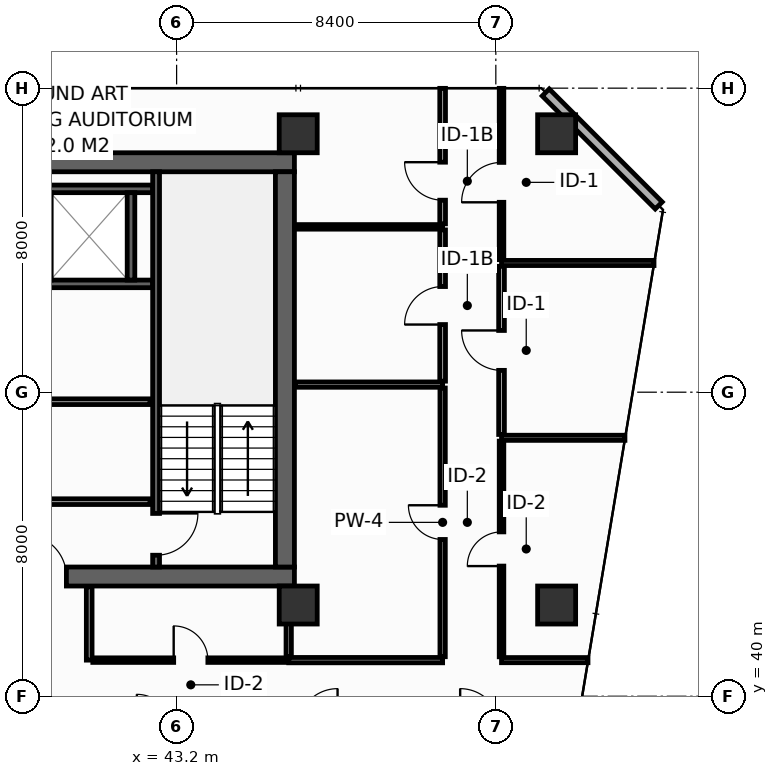
"""IFC4 building model, lengths in metres.
Left out: names, types, materials, properties, quantities, classifications, styles, units other than length and angle.
Written with IfcOpenShell. Run it as: python <this file> out.ifc"""

import sys

from ifc_helpers import new_model, si_unit, direction, frame, frame_2d, origin, origin_2d, place, context, subcontext, project, spatial, rectangle, hollow_rectangle, extrude, element, fill, save


model = new_model("IFC4")
c1 = context("Model", 3, precision=1e-05, world=origin(), true_north=direction((0.0, 1.0)))
c2 = subcontext(c1, "Body", "Model", "MODEL_VIEW")
j1 = project(units=[si_unit("LENGTHUNIT", "METRE"), si_unit("PLANEANGLEUNIT", "RADIAN")], contexts=[c1])
p1 = place(None, origin())
s1 = spatial("IfcSite", under=j1, at=p1, CompositionType="ELEMENT")
p2 = place(p1, origin())
s2 = spatial("IfcBuilding", under=s1, at=p2, CompositionType="ELEMENT")
p3 = place(p2, frame((0.0, 0.0, 148.6)))
s3 = spatial("IfcBuildingStorey", under=s2, at=p3, CompositionType="ELEMENT", Elevation=148.6)
p4 = place(p3, frame((13.6, 43.15, 0.0), z_axis=(0.0, 0.0, 1.0), x_axis=(1.0, 0.0, 0.0)))
e1 = element("IfcWall", 1, at=p4, inside=s3, PredefinedType="SHEAR", context=c2, shape_type="SweptSolid", body=[
    extrude(rectangle(XDim=32.7, YDim=0.5, at=frame_2d((16.35, 0.0))), origin(), (0.0, 0.0, 1.0), 3.55),
])
p5 = place(p4, frame((5.4, 0.0, 0.0)))
e2 = element("IfcOpeningElement", 2, at=p5, cuts=e1, PredefinedType="OPENING", context=c2, shape_type="SweptSolid", body=[
    extrude(rectangle(XDim=1.1, YDim=2.15, at=frame_2d((0.55, 1.075))), frame((0.0, 0.26, 0.0), z_axis=(0.0, -1.0, 0.0), x_axis=(1.0, 0.0, 0.0)), (0.0, 0.0, 1.0), 0.52),
])
p6 = place(p4, frame((25.6, 0.0, 0.0)))
e3 = element("IfcOpeningElement", 3, at=p6, cuts=e1, PredefinedType="OPENING", context=c2, shape_type="SweptSolid", body=[
    extrude(rectangle(XDim=1.1, YDim=2.15, at=frame_2d((0.55, 1.075))), frame((0.0, 0.26, 0.0), z_axis=(0.0, -1.0, 0.0), x_axis=(1.0, 0.0, 0.0)), (0.0, 0.0, 1.0), 0.52),
])
p7 = place(p3, frame((13.6, 54.05, 0.0), z_axis=(0.0, 0.0, 1.0), x_axis=(1.0, 0.0, 0.0)))
e4 = element("IfcWall", 4, at=p7, inside=s3, PredefinedType="SHEAR", context=c2, shape_type="SweptSolid", body=[
    extrude(rectangle(XDim=32.7, YDim=0.5, at=frame_2d((16.35, 0.0))), origin(), (0.0, 0.0, 1.0), 3.55),
])
p8 = place(p3, frame((46.05, 43.4, 0.0), z_axis=(0.0, 0.0, 1.0), x_axis=(0.0, 1.0, 0.0)))
e5 = element("IfcWall", 5, at=p8, inside=s3, PredefinedType="SHEAR", context=c2, shape_type="SweptSolid", body=[
    extrude(rectangle(XDim=10.4, YDim=0.5, at=frame_2d((5.2, 0.0))), origin(), (0.0, 0.0, 1.0), 3.55),
])
for number, where, z_axis, x_axis in (
    (6, (46.4, 54.8, 0.0), (0.0, 0.0, 1.0), (1.0, 0.0, 0.0)),
    (7, (53.2, 54.8, 0.0), (0.0, 0.0, 1.0), (1.0, 0.0, 0.0)),
    (8, (46.4, 42.4, 0.0), (0.0, 0.0, 1.0), (1.0, 0.0, 0.0)),
    (9, (53.2, 42.4, 0.0), (0.0, 0.0, 1.0), (1.0, 0.0, 0.0)),
):
    element("IfcColumn", number, at=place(p3, frame(where, z_axis=z_axis, x_axis=x_axis)), inside=s3, PredefinedType="COLUMN", context=c2, shape_type="SweptSolid", body=[
        extrude(hollow_rectangle(XDim=1.0, YDim=1.0, WallThickness=0.045, at=origin_2d()), origin(), (0.0, 0.0, 1.0), 3.8),
    ])
for number, where, z_axis, x_axis in (
    (10, (39.525, 50.85, 0.0), (0.0, 0.0, 1.0), (1.0, 0.0, 0.0)),
    (11, (39.525, 53.35, 0.0), (0.0, 0.0, 1.0), (1.0, 0.0, 0.0)),
):
    element("IfcWall", number, at=place(p3, frame(where, z_axis=z_axis, x_axis=x_axis)), inside=s3, PredefinedType="SHEAR", context=c2, shape_type="SweptSolid", body=[
        extrude(rectangle(XDim=3.045, YDim=0.2, at=frame_2d((1.522, 0.0))), origin(), (0.0, 0.0, 1.0), 3.55),
    ])
p9 = place(p3, frame((42.0, 50.95, 0.0), z_axis=(0.0, 0.0, 1.0), x_axis=(0.0, 1.0, 0.0)))
e12 = element("IfcWall", 12, at=p9, inside=s3, PredefinedType="SHEAR", context=c2, shape_type="SweptSolid", body=[
    extrude(rectangle(XDim=2.3, YDim=0.2, at=frame_2d((1.15, 0.0))), origin(), (0.0, 0.0, 1.0), 3.55),
])
p10 = place(p3, frame((42.66, 53.8, 0.0), z_axis=(0.0, 0.0, 1.0), x_axis=(0.0, -1.0, 0.0)))
e13 = element("IfcWall", 13, at=p10, inside=s3, PredefinedType="SHEAR", context=c2, shape_type="SweptSolid", body=[
    extrude(rectangle(XDim=10.4, YDim=0.18, at=frame_2d((5.2, 0.0))), origin(), (0.0, 0.0, 1.0), 3.55),
])
p11 = place(p10, frame((8.99, 0.0, 0.0)))
e14 = element("IfcOpeningElement", 14, at=p11, cuts=e13, PredefinedType="OPENING", context=c2, shape_type="SweptSolid", body=[
    extrude(rectangle(XDim=1.1, YDim=2.15, at=frame_2d((0.55, 1.075))), frame((0.0, 0.1, 0.0), z_axis=(0.0, -1.0, 0.0), x_axis=(1.0, 0.0, 0.0)), (0.0, 0.0, 1.0), 0.2),
])
p12 = place(p3, frame((34.05, 45.12, 0.0), z_axis=(0.0, 0.0, 1.0), x_axis=(1.0, 0.0, 0.0)))
e15 = element("IfcWall", 15, at=p12, inside=s3, PredefinedType="PARTITIONING", context=c2, shape_type="SweptSolid", body=[
    extrude(rectangle(XDim=8.45, YDim=0.15, at=frame_2d((4.225, 0.0))), origin(), (0.0, 0.0, 1.0), 3.55),
])
p13 = place(p12, frame((3.6, 0.0, 0.0)))
e16 = element("IfcOpeningElement", 16, at=p13, cuts=e15, PredefinedType="OPENING", context=c2, shape_type="SweptSolid", body=[
    extrude(rectangle(XDim=0.95, YDim=2.15, at=frame_2d((0.475, 1.075))), frame((0.0, 0.085, 0.0), z_axis=(0.0, -1.0, 0.0), x_axis=(1.0, 0.0, 0.0)), (0.0, 0.0, 1.0), 0.17),
])
p14 = place(p3, frame((34.05, 47.75, 0.0), z_axis=(0.0, 0.0, 1.0), x_axis=(1.0, 0.0, 0.0)))
e17 = element("IfcWall", 17, at=p14, inside=s3, PredefinedType="PARTITIONING", context=c2, shape_type="SweptSolid", body=[
    extrude(rectangle(XDim=8.45, YDim=0.15, at=frame_2d((4.225, 0.0))), origin(), (0.0, 0.0, 1.0), 3.55),
])
p15 = place(p3, frame((55.887, 52.913, 0.0), z_axis=(0.0, 0.0, 1.0), x_axis=(-0.707106781187, 0.707106781187, 0.0)))
e18 = element("IfcWall", 18, at=p15, inside=s3, PredefinedType="STANDARD", context=c2, shape_type="SweptSolid", body=[
    extrude(rectangle(XDim=4.206, YDim=0.26, at=frame_2d((2.103, 0.0))), origin(), (0.0, 0.0, 1.0), 3.55),
])
p16 = place(p3, frame((46.15, 40.95, 0.0), z_axis=(0.0, 0.0, 1.0), x_axis=(1.0, 0.0, 0.0)))
e19 = element("IfcWall", 19, at=p16, inside=s3, PredefinedType="PARTITIONING", context=c2, shape_type="SweptSolid", body=[
    extrude(rectangle(XDim=4.05, YDim=0.14, at=frame_2d((2.025, 0.0))), origin(), (0.0, 0.0, 1.0), 3.55),
])
p17 = place(p3, frame((46.15, 41.04, 0.0), z_axis=(0.0, 0.0, 1.0), x_axis=(0.0, 1.0, 0.0)))
e20 = element("IfcWall", 20, at=p17, inside=s3, PredefinedType="PARTITIONING", context=c2, shape_type="SweptSolid", body=[
    extrude(rectangle(XDim=1.84, YDim=0.14, at=frame_2d((0.92, 0.0))), origin(), (0.0, 0.0, 1.0), 3.55),
])
p18 = place(p3, frame((46.32, 48.2, 0.0), z_axis=(0.0, 0.0, 1.0), x_axis=(1.0, 0.0, 0.0)))
e21 = element("IfcWall", 21, at=p18, inside=s3, PredefinedType="PARTITIONING", context=c2, shape_type="SweptSolid", body=[
    extrude(rectangle(XDim=3.88, YDim=0.14, at=frame_2d((1.94, 0.0))), origin(), (0.0, 0.0, 1.0), 3.55),
])
p19 = place(p3, frame((50.2, 41.04, 0.0), z_axis=(0.0, 0.0, 1.0), x_axis=(0.0, 1.0, 0.0)))
e22 = element("IfcWall", 22, at=p19, inside=s3, PredefinedType="PARTITIONING", context=c2, shape_type="SweptSolid", body=[
    extrude(rectangle(XDim=7.07, YDim=0.14, at=frame_2d((3.535, 0.0))), origin(), (0.0, 0.0, 1.0), 2.835),
])
p20 = place(p19, frame((3.085, 0.0, 0.0)))
e23 = element("IfcOpeningElement", 23, at=p20, cuts=e22, PredefinedType="OPENING", context=c2, shape_type="SweptSolid", body=[
    extrude(rectangle(XDim=0.9, YDim=2.1, at=frame_2d((0.45, 1.05))), frame((0.0, 0.08, 0.0), z_axis=(0.0, -1.0, 0.0), x_axis=(1.0, 0.0, 0.0)), (0.0, 0.0, 1.0), 0.16),
])
p21 = place(p3, frame((46.32, 52.35, 0.0), z_axis=(0.0, 0.0, 1.0), x_axis=(1.0, 0.0, 0.0)))
e24 = element("IfcWall", 24, at=p21, inside=s3, PredefinedType="PARTITIONING", context=c2, shape_type="SweptSolid", body=[
    extrude(rectangle(XDim=3.88, YDim=0.12, at=frame_2d((1.94, 0.0))), origin(), (0.0, 0.0, 1.0), 3.55),
])
p22 = place(p3, frame((50.2, 48.29, 0.0), z_axis=(0.0, 0.0, 1.0), x_axis=(0.0, 1.0, 0.0)))
e25 = element("IfcWall", 25, at=p22, inside=s3, PredefinedType="PARTITIONING", context=c2, shape_type="SweptSolid", body=[
    extrude(rectangle(XDim=3.98, YDim=0.15, at=frame_2d((1.99, 0.0))), origin(), (0.0, 0.0, 1.0), 3.55),
])
p23 = place(p22, frame((1.49, 0.0, 0.0)))
e26 = element("IfcOpeningElement", 26, at=p23, cuts=e25, PredefinedType="OPENING", context=c2, shape_type="SweptSolid", body=[
    extrude(rectangle(XDim=1.0, YDim=2.15, at=frame_2d((0.5, 1.075))), frame((0.0, 0.085, 0.0), z_axis=(0.0, -1.0, 0.0), x_axis=(1.0, 0.0, 0.0)), (0.0, 0.0, 1.0), 0.17),
])
p24 = place(p3, frame((50.2, 52.43, 0.0), z_axis=(0.0, 0.0, 1.0), x_axis=(0.0, 1.0, 0.0)))
e27 = element("IfcWall", 27, at=p24, inside=s3, PredefinedType="PARTITIONING", context=c2, shape_type="SweptSolid", body=[
    extrude(rectangle(XDim=3.565, YDim=0.15, at=frame_2d((1.783, 0.0))), origin(), (0.0, 0.0, 1.0), 2.935),
])
p25 = place(p24, frame((0.622, 0.0, 0.0)))
e28 = element("IfcOpeningElement", 28, at=p25, cuts=e27, PredefinedType="OPENING", context=c2, shape_type="SweptSolid", body=[
    extrude(rectangle(XDim=1.0, YDim=2.15, at=frame_2d((0.5, 1.075))), frame((0.0, 0.085, 0.0), z_axis=(0.0, -1.0, 0.0), x_axis=(1.0, 0.0, 0.0)), (0.0, 0.0, 1.0), 0.17),
])
p26 = place(p3, frame((51.75, 40.95, 0.0), z_axis=(0.0, 0.0, 1.0), x_axis=(1.0, 0.0, 0.0)))
e29 = element("IfcWall", 29, at=p26, inside=s3, PredefinedType="PARTITIONING", context=c2, shape_type="SweptSolid", body=[
    extrude(rectangle(XDim=2.275, YDim=0.135, at=frame_2d((1.137, 0.0))), origin(), (0.0, 0.0, 1.0), 3.035),
])
p27 = place(p3, frame((51.75, 46.8, 0.0), z_axis=(0.0, 0.0, 1.0), x_axis=(1.0, 0.0, 0.0)))
e30 = element("IfcWall", 30, at=p27, inside=s3, PredefinedType="PARTITIONING", context=c2, shape_type="SweptSolid", body=[
    extrude(rectangle(XDim=3.247, YDim=0.135, at=frame_2d((1.624, 0.0))), origin(), (0.0, 0.0, 1.0), 2.835),
])
p28 = place(p3, frame((51.75, 51.4, 0.0), z_axis=(0.0, 0.0, 1.0), x_axis=(1.0, 0.0, 0.0)))
e31 = element("IfcWall", 31, at=p28, inside=s3, PredefinedType="PARTITIONING", context=c2, shape_type="SweptSolid", body=[
    extrude(rectangle(XDim=4.012, YDim=0.135, at=frame_2d((2.006, 0.0))), origin(), (0.0, 0.0, 1.0), 2.835),
])
p29 = place(p3, frame((51.75, 41.038, 0.0), z_axis=(0.0, 0.0, 1.0), x_axis=(0.0, 1.0, 0.0)))
e32 = element("IfcWall", 32, at=p29, inside=s3, PredefinedType="PARTITIONING", context=c2, shape_type="SweptSolid", body=[
    extrude(rectangle(XDim=5.675, YDim=0.12, at=frame_2d((2.837, 0.0))), origin(), (0.0, 0.0, 1.0), 2.835),
])
p30 = place(p29, frame((2.387, 0.0, 0.0)))
e33 = element("IfcOpeningElement", 33, at=p30, cuts=e32, PredefinedType="OPENING", context=c2, shape_type="SweptSolid", body=[
    extrude(rectangle(XDim=0.9, YDim=2.1, at=frame_2d((0.45, 1.05))), frame((0.0, 0.07, 0.0), z_axis=(0.0, -1.0, 0.0), x_axis=(1.0, 0.0, 0.0)), (0.0, 0.0, 1.0), 0.14),
])
p31 = place(p3, frame((51.75, 46.887, 0.0), z_axis=(0.0, 0.0, 1.0), x_axis=(0.0, 1.0, 0.0)))
e34 = element("IfcWall", 34, at=p31, inside=s3, PredefinedType="PARTITIONING", context=c2, shape_type="SweptSolid", body=[
    extrude(rectangle(XDim=4.425, YDim=0.15, at=frame_2d((2.212, 0.0))), origin(), (0.0, 0.0, 1.0), 3.55),
])
p32 = place(p31, frame((1.687, 0.0, 0.0)))
e35 = element("IfcOpeningElement", 35, at=p32, cuts=e34, PredefinedType="OPENING", context=c2, shape_type="SweptSolid", body=[
    extrude(rectangle(XDim=1.05, YDim=2.15, at=frame_2d((0.525, 1.075))), frame((0.0, 0.085, 0.0), z_axis=(0.0, -1.0, 0.0), x_axis=(1.0, 0.0, 0.0)), (0.0, 0.0, 1.0), 0.17),
])
p33 = place(p3, frame((51.75, 51.488, 0.0), z_axis=(0.0, 0.0, 1.0), x_axis=(0.0, 1.0, 0.0)))
e36 = element("IfcWall", 36, at=p33, inside=s3, PredefinedType="PARTITIONING", context=c2, shape_type="SweptSolid", body=[
    extrude(rectangle(XDim=4.508, YDim=0.12, at=frame_2d((2.254, 0.0))), origin(), (0.0, 0.0, 1.0), 2.935),
])
p34 = place(p33, frame((1.509, 0.0, 0.0)))
e37 = element("IfcOpeningElement", 37, at=p34, cuts=e36, PredefinedType="OPENING", context=c2, shape_type="SweptSolid", body=[
    extrude(rectangle(XDim=1.05, YDim=2.15, at=frame_2d((0.525, 1.075))), frame((0.0, 0.07, 0.0), z_axis=(0.0, -1.0, 0.0), x_axis=(1.0, 0.0, 0.0)), (0.0, 0.0, 1.0), 0.14),
])
p35 = place(p3, frame((40.9, 40.95, 0.0), z_axis=(0.0, 0.0, 1.0), x_axis=(0.0, 1.0, 0.0)))
e38 = element("IfcWall", 38, at=p35, inside=s3, PredefinedType="PARTITIONING", context=c2, shape_type="SweptSolid", body=[
    extrude(rectangle(XDim=1.93, YDim=0.15, at=frame_2d((0.965, 0.0))), origin(), (0.0, 0.0, 1.0), 3.55),
])
p36 = place(p3, frame((40.995, 40.95, 0.0), z_axis=(0.0, 0.0, 1.0), x_axis=(1.0, 0.0, 0.0)))
e39 = element("IfcWall", 39, at=p36, inside=s3, PredefinedType="PARTITIONING", context=c2, shape_type="SweptSolid", body=[
    extrude(rectangle(XDim=5.155, YDim=0.12, at=frame_2d((2.577, 0.0))), origin(), (0.0, 0.0, 1.0), 3.55),
])
p37 = place(p36, frame((2.128, 0.0, 0.0)))
e40 = element("IfcOpeningElement", 40, at=p37, cuts=e39, PredefinedType="OPENING", context=c2, shape_type="SweptSolid", body=[
    extrude(rectangle(XDim=0.9, YDim=2.1, at=frame_2d((0.45, 1.05))), frame((0.0, 0.07, 0.0), z_axis=(0.0, -1.0, 0.0), x_axis=(1.0, 0.0, 0.0)), (0.0, 0.0, 1.0), 0.14),
])
p38 = place(p11, origin())
e41 = element("IfcDoor", 41, at=p38, inside=s3, OperationType="SINGLE_SWING_LEFT", PredefinedType="DOOR", context=c2, shape_type="SweptSolid", body=[
    extrude(rectangle(XDim=1.1, YDim=2.15, at=frame_2d((0.55, 1.075))), frame((0.0, 0.025, 0.0), z_axis=(0.0, -1.0, 0.0), x_axis=(1.0, 0.0, 0.0)), (0.0, 0.0, 1.0), 0.05),
])
fill(e14, e41)
p39 = place(p6, origin())
e42 = element("IfcDoor", 42, at=p39, inside=s3, OperationType="SINGLE_SWING_LEFT", PredefinedType="DOOR", context=c2, shape_type="SweptSolid", body=[
    extrude(rectangle(XDim=1.1, YDim=2.15, at=frame_2d((0.55, 1.075))), frame((0.0, 0.025, 0.0), z_axis=(0.0, -1.0, 0.0), x_axis=(1.0, 0.0, 0.0)), (0.0, 0.0, 1.0), 0.05),
])
fill(e3, e42)
p40 = place(p20, origin())
e43 = element("IfcDoor", 43, at=p40, inside=s3, OperationType="SINGLE_SWING_RIGHT", PredefinedType="DOOR", context=c2, shape_type="SweptSolid", body=[
    extrude(rectangle(XDim=0.9, YDim=2.1, at=frame_2d((0.45, 1.05))), frame((0.0, 0.025, 0.0), z_axis=(0.0, -1.0, 0.0), x_axis=(1.0, 0.0, 0.0)), (0.0, 0.0, 1.0), 0.05),
])
fill(e23, e43)
p41 = place(p23, origin())
e44 = element("IfcDoor", 44, at=p41, inside=s3, OperationType="SINGLE_SWING_LEFT", PredefinedType="DOOR", context=c2, shape_type="SweptSolid", body=[
    extrude(rectangle(XDim=1.0, YDim=2.15, at=frame_2d((0.5, 1.075))), frame((0.0, 0.025, 0.0), z_axis=(0.0, -1.0, 0.0), x_axis=(1.0, 0.0, 0.0)), (0.0, 0.0, 1.0), 0.05),
])
fill(e26, e44)
p42 = place(p25, origin())
e45 = element("IfcDoor", 45, at=p42, inside=s3, OperationType="SINGLE_SWING_RIGHT", PredefinedType="DOOR", context=c2, shape_type="SweptSolid", body=[
    extrude(rectangle(XDim=1.0, YDim=2.15, at=frame_2d((0.5, 1.075))), frame((0.0, 0.025, 0.0), z_axis=(0.0, -1.0, 0.0), x_axis=(1.0, 0.0, 0.0)), (0.0, 0.0, 1.0), 0.05),
])
fill(e28, e45)
p43 = place(p30, origin())
e46 = element("IfcDoor", 46, at=p43, inside=s3, OperationType="SINGLE_SWING_LEFT", PredefinedType="DOOR", context=c2, shape_type="SweptSolid", body=[
    extrude(rectangle(XDim=0.9, YDim=2.1, at=frame_2d((0.45, 1.05))), frame((0.0, 0.025, 0.0), z_axis=(0.0, -1.0, 0.0), x_axis=(1.0, 0.0, 0.0)), (0.0, 0.0, 1.0), 0.05),
])
fill(e33, e46)
p44 = place(p32, origin())
e47 = element("IfcDoor", 47, at=p44, inside=s3, OperationType="SINGLE_SWING_RIGHT", PredefinedType="DOOR", context=c2, shape_type="SweptSolid", body=[
    extrude(rectangle(XDim=1.05, YDim=2.15, at=frame_2d((0.525, 1.075))), frame((0.0, 0.025, 0.0), z_axis=(0.0, -1.0, 0.0), x_axis=(1.0, 0.0, 0.0)), (0.0, 0.0, 1.0), 0.05),
])
fill(e35, e47)
p45 = place(p34, origin())
e48 = element("IfcDoor", 48, at=p45, inside=s3, OperationType="SINGLE_SWING_LEFT", PredefinedType="DOOR", context=c2, shape_type="SweptSolid", body=[
    extrude(rectangle(XDim=1.05, YDim=2.15, at=frame_2d((0.525, 1.075))), frame((0.0, 0.025, 0.0), z_axis=(0.0, -1.0, 0.0), x_axis=(1.0, 0.0, 0.0)), (0.0, 0.0, 1.0), 0.05),
])
fill(e37, e48)
p46 = place(p37, origin())
e49 = element("IfcDoor", 49, at=p46, inside=s3, OperationType="SINGLE_SWING_LEFT", PredefinedType="DOOR", context=c2, shape_type="SweptSolid", body=[
    extrude(rectangle(XDim=0.9, YDim=2.1, at=frame_2d((0.45, 1.05))), frame((0.0, 0.025, 0.0), z_axis=(0.0, -1.0, 0.0), x_axis=(1.0, 0.0, 0.0)), (0.0, 0.0, 1.0), 0.05),
])
fill(e40, e49)
save(model, sys.argv[1])
